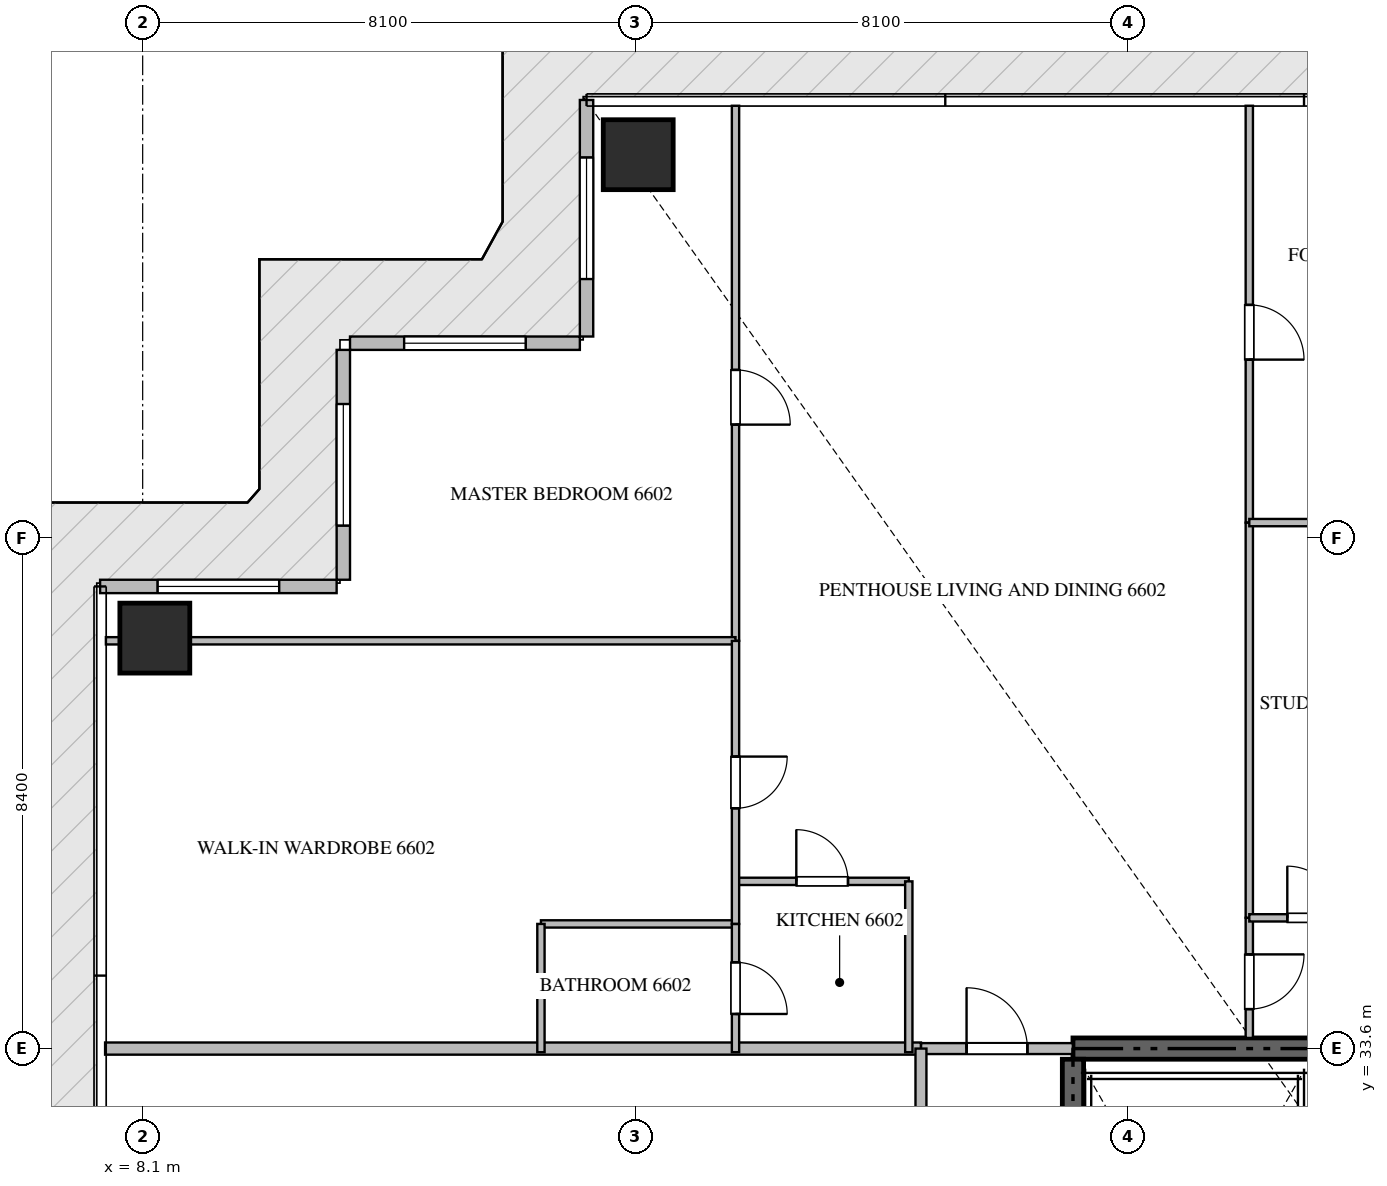
"""IFC4 building model, lengths in metres.
Left out: names, types, materials, properties, quantities, classifications, styles, units other than length and angle.
Written with IfcOpenShell. Run it as: python <this file> out.ifc"""

import sys

from ifc_helpers import new_model, si_unit, direction, frame, frame_2d, origin, origin_2d, place, context, subcontext, project, spatial, rectangle, extrude, source, transform, mapped, element, fill, save


model = new_model("IFC4")
c1 = context("Model", 3, precision=1e-05, world=origin(), true_north=direction((0.0, 1.0)))
c2 = subcontext(c1, "Body", "Model", "MODEL_VIEW")
j1 = project(units=[si_unit("LENGTHUNIT", "METRE"), si_unit("PLANEANGLEUNIT", "RADIAN")], contexts=[c1])
p1 = place(None, origin())
s1 = spatial("IfcSite", under=j1, at=p1, CompositionType="ELEMENT")
p2 = place(p1, origin())
s2 = spatial("IfcBuilding", under=s1, at=p2, CompositionType="ELEMENT")
p3 = place(p2, frame((0.0, 0.0, 264.35)))
s3 = spatial("IfcBuildingStorey", under=s2, at=p3, CompositionType="ELEMENT", Elevation=264.35)
p4 = place(p3, frame((41.4, 33.6, -0.26), z_axis=(0.0, 0.0, 1.0), x_axis=(-1.0, 0.0, 0.0)))
e1 = element("IfcWall", 1, at=p4, inside=s3, PredefinedType="SHEAR", context=c2, shape_type="SweptSolid", body=[
    extrude(rectangle(XDim=18.0, YDim=0.35, at=frame_2d((9.0, 0.0))), origin(), (0.0, 0.0, 1.0), 3.848),
])
p5 = place(p3, frame((23.4, 24.25, -0.26), z_axis=(0.0, 0.0, 1.0), x_axis=(0.0, 1.0, 0.0)))
e2 = element("IfcWall", 2, at=p5, inside=s3, PredefinedType="SHEAR", context=c2, shape_type="SweptSolid", body=[
    extrude(rectangle(XDim=9.175, YDim=0.35, at=frame_2d((4.587, 0.0))), origin(), (0.0, 0.0, 1.0), 3.848),
])
m1 = source(origin(), c2, "Body", "SweptSolid", [
    extrude(rectangle(XDim=1.15, YDim=1.15, at=origin_2d()), origin(), (0.0, 0.0, 1.0), 3.85),
])
for number, where, z_axis, x_axis in (
    (3, (16.25, 48.3, -0.26), (0.0, 0.0, 1.0), (1.0, 0.0, 0.0)),
    (4, (8.3, 40.35, -0.26), (0.0, 0.0, 1.0), (1.0, 0.0, 0.0)),
):
    element("IfcColumn", number, at=place(p3, frame(where, z_axis=z_axis, x_axis=x_axis)), inside=s3, PredefinedType="COLUMN", context=c2, shape_type="MappedRepresentation", body=[
        mapped(m1, transform((0.0, 0.0, 0.0), scale=1.0)),
    ])
p6 = place(p3, frame((15.4, 49.2, 0.0), z_axis=(0.0, 0.0, 1.0), x_axis=(0.0, -1.0, 0.0)))
e5 = element("IfcWall", 5, at=p6, inside=s3, PredefinedType="ELEMENTEDWALL", context=c2, shape_type="SweptSolid", body=[
    extrude(rectangle(XDim=3.89, YDim=0.22, at=frame_2d((1.945, 0.0))), origin(), (0.0, 0.0, 1.0), 3.575),
])
p7 = place(p6, frame((0.945, 0.0, 0.65)))
e6 = element("IfcOpeningElement", 6, at=p7, cuts=e5, PredefinedType="OPENING", context=c2, shape_type="SweptSolid", body=[
    extrude(rectangle(XDim=2.0, YDim=2.2, at=frame_2d((1.0, 1.1))), frame((0.0, 0.12, 0.0), z_axis=(0.0, -1.0, 0.0), x_axis=(1.0, 0.0, 0.0)), (0.0, 0.0, 1.0), 0.24),
])
p8 = place(p3, frame((15.29, 45.2, 0.0), z_axis=(0.0, 0.0, 1.0), x_axis=(-1.0, 0.0, 0.0)))
e7 = element("IfcWall", 7, at=p8, inside=s3, PredefinedType="ELEMENTEDWALL", context=c2, shape_type="SweptSolid", body=[
    extrude(rectangle(XDim=3.78, YDim=0.22, at=frame_2d((1.89, 0.0))), origin(), (0.0, 0.0, 1.0), 3.575),
])
p9 = place(p8, frame((0.89, 0.0, 0.65)))
e8 = element("IfcOpeningElement", 8, at=p9, cuts=e7, PredefinedType="OPENING", context=c2, shape_type="SweptSolid", body=[
    extrude(rectangle(XDim=2.0, YDim=2.2, at=frame_2d((1.0, 1.1))), frame((0.0, 0.12, 0.0), z_axis=(0.0, -1.0, 0.0), x_axis=(1.0, 0.0, 0.0)), (0.0, 0.0, 1.0), 0.24),
])
p10 = place(p3, frame((11.4, 45.09, 0.0), z_axis=(0.0, 0.0, 1.0), x_axis=(0.0, -1.0, 0.0)))
e9 = element("IfcWall", 9, at=p10, inside=s3, PredefinedType="ELEMENTEDWALL", context=c2, shape_type="SweptSolid", body=[
    extrude(rectangle(XDim=3.78, YDim=0.22, at=frame_2d((1.89, 0.0))), origin(), (0.0, 0.0, 1.0), 3.575),
])
p11 = place(p10, frame((0.89, 0.0, 0.65)))
e10 = element("IfcOpeningElement", 10, at=p11, cuts=e9, PredefinedType="OPENING", context=c2, shape_type="SweptSolid", body=[
    extrude(rectangle(XDim=2.0, YDim=2.2, at=frame_2d((1.0, 1.1))), frame((0.0, 0.12, 0.0), z_axis=(0.0, -1.0, 0.0), x_axis=(1.0, 0.0, 0.0)), (0.0, 0.0, 1.0), 0.24),
])
p12 = place(p3, frame((11.29, 41.2, 0.0), z_axis=(0.0, 0.0, 1.0), x_axis=(-1.0, 0.0, 0.0)))
e11 = element("IfcWall", 11, at=p12, inside=s3, PredefinedType="ELEMENTEDWALL", context=c2, shape_type="SweptSolid", body=[
    extrude(rectangle(XDim=3.89, YDim=0.22, at=frame_2d((1.945, 0.0))), origin(), (0.0, 0.0, 1.0), 3.575),
])
p13 = place(p12, frame((0.945, 0.0, 0.65)))
e12 = element("IfcOpeningElement", 12, at=p13, cuts=e11, PredefinedType="OPENING", context=c2, shape_type="SweptSolid", body=[
    extrude(rectangle(XDim=2.0, YDim=2.2, at=frame_2d((1.0, 1.1))), frame((0.0, 0.12, 0.0), z_axis=(0.0, -1.0, 0.0), x_axis=(1.0, 0.0, 0.0)), (0.0, 0.0, 1.0), 0.24),
])
p14 = place(p3, frame((7.482, 33.6, 0.0), z_axis=(0.0, 0.0, 1.0), x_axis=(1.0, 0.0, 0.0)))
e13 = element("IfcWall", 13, at=p14, inside=s3, PredefinedType="PARTITIONING", context=c2, shape_type="SweptSolid", body=[
    extrude(rectangle(XDim=13.418, YDim=0.2, at=frame_2d((6.709, 0.0))), origin(), (0.0, 0.0, 1.0), 3.59),
])
p15 = place(p3, frame((20.902, 33.6, 0.0), z_axis=(0.0, 0.0, 1.0), x_axis=(1.0, 0.0, 0.0)))
e14 = element("IfcWall", 14, at=p15, inside=s3, PredefinedType="PARTITIONING", context=c2, shape_type="SweptSolid", body=[
    extrude(rectangle(XDim=2.496, YDim=0.18, at=frame_2d((1.248, 0.0))), origin(), (0.0, 0.0, 1.0), 3.59),
])
p16 = place(p15, frame((0.748, 0.0, 0.0)))
e15 = element("IfcOpeningElement", 15, at=p16, cuts=e14, PredefinedType="OPENING", context=c2, shape_type="SweptSolid", body=[
    extrude(rectangle(XDim=1.0, YDim=2.15, at=frame_2d((0.5, 1.075))), frame((0.0, 0.1, 0.0), z_axis=(0.0, -1.0, 0.0), x_axis=(1.0, 0.0, 0.0)), (0.0, 0.0, 1.0), 0.2),
])
p17 = place(p3, frame((20.9, 16.8, 0.0), z_axis=(0.0, 0.0, 1.0), x_axis=(0.0, 1.0, 0.0)))
e16 = element("IfcWall", 16, at=p17, inside=s3, PredefinedType="PARTITIONING", context=c2, shape_type="SweptSolid", body=[
    extrude(rectangle(XDim=16.8, YDim=0.18, at=frame_2d((8.4, 0.0))), origin(), (0.0, 0.0, 1.0), 3.59),
])
p18 = place(p17, frame((4.993, 0.0, 0.0)))
e17 = element("IfcOpeningElement", 17, at=p18, cuts=e16, PredefinedType="OPENING", context=c2, shape_type="SweptSolid", body=[
    extrude(rectangle(XDim=1.0, YDim=2.15, at=frame_2d((0.5, 1.075))), frame((0.0, 0.1, 0.0), z_axis=(0.0, -1.0, 0.0), x_axis=(1.0, 0.0, 0.0)), (0.0, 0.0, 1.0), 0.2),
])
p19 = place(p17, frame((13.351, 0.0, 0.0)))
e18 = element("IfcOpeningElement", 18, at=p19, cuts=e16, PredefinedType="OPENING", context=c2, shape_type="SweptSolid", body=[
    extrude(rectangle(XDim=1.0, YDim=2.15, at=frame_2d((0.5, 1.075))), frame((0.0, 0.1, 0.0), z_axis=(0.0, -1.0, 0.0), x_axis=(1.0, 0.0, 0.0)), (0.0, 0.0, 1.0), 0.2),
])
p20 = place(p3, frame((17.85, 36.35, 0.0), z_axis=(0.0, 0.0, 1.0), x_axis=(1.0, 0.0, 0.0)))
e19 = element("IfcWall", 19, at=p20, inside=s3, PredefinedType="PARTITIONING", context=c2, shape_type="SweptSolid", body=[
    extrude(rectangle(XDim=2.85, YDim=0.12, at=frame_2d((1.425, 0.0))), origin(), (0.0, 0.0, 1.0), 3.59),
])
p21 = place(p20, frame((1.0, 0.0, 0.0)))
e20 = element("IfcOpeningElement", 20, at=p21, cuts=e19, PredefinedType="OPENING", context=c2, shape_type="SweptSolid", body=[
    extrude(rectangle(XDim=0.85, YDim=2.1, at=frame_2d((0.425, 1.05))), frame((0.0, 0.07, 0.0), z_axis=(0.0, -1.0, 0.0), x_axis=(1.0, 0.0, 0.0)), (0.0, 0.0, 1.0), 0.14),
])
p22 = place(p3, frame((20.7, 36.35, 0.0), z_axis=(0.0, 0.0, 1.0), x_axis=(0.0, -1.0, 0.0)))
e21 = element("IfcWall", 21, at=p22, inside=s3, PredefinedType="PARTITIONING", context=c2, shape_type="SweptSolid", body=[
    extrude(rectangle(XDim=2.81, YDim=0.12, at=frame_2d((1.405, 0.0))), origin(), (0.0, 0.0, 1.0), 3.59),
])
p23 = place(p3, frame((17.85, 49.105, 0.0), z_axis=(0.0, 0.0, 1.0), x_axis=(0.0, -1.0, 0.0)))
e22 = element("IfcWall", 22, at=p23, inside=s3, PredefinedType="PARTITIONING", context=c2, shape_type="SweptSolid", body=[
    extrude(rectangle(XDim=8.799, YDim=0.12, at=frame_2d((4.399, 0.0))), origin(), (0.0, 0.0, 1.0), 3.59),
])
p24 = place(p23, frame((4.344, 0.0, 0.0)))
e23 = element("IfcOpeningElement", 23, at=p24, cuts=e22, PredefinedType="OPENING", context=c2, shape_type="SweptSolid", body=[
    extrude(rectangle(XDim=0.9, YDim=2.1, at=frame_2d((0.45, 1.05))), frame((0.0, 0.07, 0.0), z_axis=(0.0, -1.0, 0.0), x_axis=(1.0, 0.0, 0.0)), (0.0, 0.0, 1.0), 0.14),
])
p25 = place(p3, frame((7.495, 40.306, 0.0), z_axis=(0.0, 0.0, 1.0), x_axis=(1.0, 0.0, 0.0)))
e24 = element("IfcWall", 24, at=p25, inside=s3, PredefinedType="PARTITIONING", context=c2, shape_type="SweptSolid", body=[
    extrude(rectangle(XDim=10.355, YDim=0.12, at=frame_2d((5.177, 0.0))), origin(), (0.0, 0.0, 1.0), 3.122),
])
p26 = place(p3, frame((14.65, 35.65, 0.0), z_axis=(0.0, 0.0, 1.0), x_axis=(1.0, 0.0, 0.0)))
e25 = element("IfcWall", 25, at=p26, inside=s3, PredefinedType="PARTITIONING", context=c2, shape_type="SweptSolid", body=[
    extrude(rectangle(XDim=3.2, YDim=0.12, at=frame_2d((1.6, 0.0))), origin(), (0.0, 0.0, 1.0), 3.59),
])
p27 = place(p3, frame((14.65, 35.65, 0.0), z_axis=(0.0, 0.0, 1.0), x_axis=(0.0, -1.0, 0.0)))
e26 = element("IfcWall", 26, at=p27, inside=s3, PredefinedType="PARTITIONING", context=c2, shape_type="SweptSolid", body=[
    extrude(rectangle(XDim=2.11, YDim=0.12, at=frame_2d((1.055, 0.0))), origin(), (0.0, 0.0, 1.0), 3.59),
])
p28 = place(p3, frame((17.85, 40.304, 0.0), z_axis=(0.0, 0.0, 1.0), x_axis=(0.0, -1.0, 0.0)))
e27 = element("IfcWall", 27, at=p28, inside=s3, PredefinedType="PARTITIONING", context=c2, shape_type="SweptSolid", body=[
    extrude(rectangle(XDim=4.654, YDim=0.12, at=frame_2d((2.327, 0.0))), origin(), (0.0, 0.0, 1.0), 3.59),
])
p29 = place(p28, frame((1.902, 0.0, 0.0)))
e28 = element("IfcOpeningElement", 28, at=p29, cuts=e27, PredefinedType="OPENING", context=c2, shape_type="SweptSolid", body=[
    extrude(rectangle(XDim=0.85, YDim=2.1, at=frame_2d((0.425, 1.05))), frame((0.0, 0.07, 0.0), z_axis=(0.0, -1.0, 0.0), x_axis=(1.0, 0.0, 0.0)), (0.0, 0.0, 1.0), 0.14),
])
p30 = place(p3, frame((17.85, 35.648, 0.0), z_axis=(0.0, 0.0, 1.0), x_axis=(0.0, -1.0, 0.0)))
e29 = element("IfcWall", 29, at=p30, inside=s3, PredefinedType="PARTITIONING", context=c2, shape_type="SweptSolid", body=[
    extrude(rectangle(XDim=2.108, YDim=0.12, at=frame_2d((1.054, 0.0))), origin(), (0.0, 0.0, 1.0), 3.59),
])
p31 = place(p30, frame((0.629, 0.0, 0.0)))
e30 = element("IfcOpeningElement", 30, at=p31, cuts=e29, PredefinedType="OPENING", context=c2, shape_type="SweptSolid", body=[
    extrude(rectangle(XDim=0.85, YDim=2.1, at=frame_2d((0.425, 1.05))), frame((0.0, 0.07, 0.0), z_axis=(0.0, -1.0, 0.0), x_axis=(1.0, 0.0, 0.0)), (0.0, 0.0, 1.0), 0.14),
])
p32 = place(p3, frame((26.3, 35.75, 0.0), z_axis=(0.0, 0.0, 1.0), x_axis=(0.0, -1.0, 0.0)))
e31 = element("IfcWall", 31, at=p32, inside=s3, PredefinedType="PARTITIONING", context=c2, shape_type="SweptSolid", body=[
    extrude(rectangle(XDim=1.975, YDim=0.12, at=frame_2d((0.988, 0.0))), origin(), (0.0, 0.0, 1.0), 3.59),
])
p33 = place(p32, frame((0.601, 0.0, 0.0)))
e32 = element("IfcOpeningElement", 32, at=p33, cuts=e31, PredefinedType="OPENING", context=c2, shape_type="SweptSolid", body=[
    extrude(rectangle(XDim=0.9, YDim=2.1, at=frame_2d((0.45, 1.05))), frame((0.0, 0.07, 0.0), z_axis=(0.0, -1.0, 0.0), x_axis=(1.0, 0.0, 0.0)), (0.0, 0.0, 1.0), 0.14),
])
p34 = place(p3, frame((26.3, 49.105, 0.0), z_axis=(0.0, 0.0, 1.0), x_axis=(0.0, -1.0, 0.0)))
e33 = element("IfcWall", 33, at=p34, inside=s3, PredefinedType="PARTITIONING", context=c2, shape_type="SweptSolid", body=[
    extrude(rectangle(XDim=6.855, YDim=0.12, at=frame_2d((3.427, 0.0))), origin(), (0.0, 0.0, 1.0), 3.59),
])
p35 = place(p34, frame((3.275, 0.0, 0.0)))
e34 = element("IfcOpeningElement", 34, at=p35, cuts=e33, PredefinedType="OPENING", context=c2, shape_type="SweptSolid", body=[
    extrude(rectangle(XDim=0.9, YDim=2.1, at=frame_2d((0.45, 1.05))), frame((0.0, 0.07, 0.0), z_axis=(0.0, -1.0, 0.0), x_axis=(1.0, 0.0, 0.0)), (0.0, 0.0, 1.0), 0.14),
])
p36 = place(p3, frame((26.3, 42.248, 0.0), z_axis=(0.0, 0.0, 1.0), x_axis=(0.0, -1.0, 0.0)))
e35 = element("IfcWall", 35, at=p36, inside=s3, PredefinedType="PARTITIONING", context=c2, shape_type="SweptSolid", body=[
    extrude(rectangle(XDim=6.496, YDim=0.12, at=frame_2d((3.248, 0.0))), origin(), (0.0, 0.0, 1.0), 3.59),
])
p37 = place(p3, frame((26.3, 42.25, 0.0), z_axis=(0.0, 0.0, 1.0), x_axis=(1.0, 0.0, 0.0)))
e36 = element("IfcWall", 36, at=p37, inside=s3, PredefinedType="PARTITIONING", context=c2, shape_type="SweptSolid", body=[
    extrude(rectangle(XDim=5.15, YDim=0.12, at=frame_2d((2.575, 0.0))), origin(), (0.0, 0.0, 1.0), 3.59),
])
p38 = place(p3, frame((26.3, 35.75, 0.0), z_axis=(0.0, 0.0, 1.0), x_axis=(1.0, 0.0, 0.0)))
e37 = element("IfcWall", 37, at=p38, inside=s3, PredefinedType="PARTITIONING", context=c2, shape_type="SweptSolid", body=[
    extrude(rectangle(XDim=2.1, YDim=0.12, at=frame_2d((1.05, 0.0))), origin(), (0.0, 0.0, 1.0), 3.59),
])
p39 = place(p38, frame((0.625, 0.0, 0.0)))
e38 = element("IfcOpeningElement", 38, at=p39, cuts=e37, PredefinedType="OPENING", context=c2, shape_type="SweptSolid", body=[
    extrude(rectangle(XDim=0.85, YDim=2.1, at=frame_2d((0.425, 1.05))), frame((0.0, 0.07, 0.0), z_axis=(0.0, -1.0, 0.0), x_axis=(1.0, 0.0, 0.0)), (0.0, 0.0, 1.0), 0.14),
])
m2 = source(origin(), c2, "Body", "SweptSolid", [
    extrude(rectangle(XDim=2.0, YDim=2.2, at=frame_2d((1.0, 1.1))), frame((0.0, 0.03, 0.0), z_axis=(0.0, -1.0, 0.0), x_axis=(1.0, 0.0, 0.0)), (0.0, 0.0, 1.0), 0.06),
])
p40 = place(p7, origin())
e39 = element("IfcWindow", 39, at=p40, inside=s3, PartitioningType="SINGLE_PANEL", PredefinedType="WINDOW", context=c2, shape_type="MappedRepresentation", body=[
    mapped(m2, transform((0.0, 0.0, 0.0), scale=1.0)),
])
fill(e6, e39)
p41 = place(p9, origin())
e40 = element("IfcWindow", 40, at=p41, inside=s3, PartitioningType="SINGLE_PANEL", PredefinedType="WINDOW", context=c2, shape_type="MappedRepresentation", body=[
    mapped(m2, transform((0.0, 0.0, 0.0), scale=1.0)),
])
fill(e8, e40)
p42 = place(p11, origin())
e41 = element("IfcWindow", 41, at=p42, inside=s3, PartitioningType="SINGLE_PANEL", PredefinedType="WINDOW", context=c2, shape_type="MappedRepresentation", body=[
    mapped(m2, transform((0.0, 0.0, 0.0), scale=1.0)),
])
fill(e10, e41)
p43 = place(p13, origin())
e42 = element("IfcWindow", 42, at=p43, inside=s3, PartitioningType="SINGLE_PANEL", PredefinedType="WINDOW", context=c2, shape_type="MappedRepresentation", body=[
    mapped(m2, transform((0.0, 0.0, 0.0), scale=1.0)),
])
fill(e12, e42)
m3 = source(origin(), c2, "Body", "SweptSolid", [
    extrude(rectangle(XDim=1.0, YDim=2.15, at=frame_2d((0.5, 1.075))), frame((0.0, 0.025, 0.0), z_axis=(0.0, -1.0, 0.0), x_axis=(1.0, 0.0, 0.0)), (0.0, 0.0, 1.0), 0.05),
])
p44 = place(p16, origin())
e43 = element("IfcDoor", 43, at=p44, inside=s3, OperationType="SINGLE_SWING_LEFT", PredefinedType="DOOR", context=c2, shape_type="MappedRepresentation", body=[
    mapped(m3, transform((0.0, 0.0, 0.0), scale=1.0)),
])
fill(e15, e43)
m4 = source(origin(), c2, "Body", "SweptSolid", [
    extrude(rectangle(XDim=0.85, YDim=2.1, at=frame_2d((0.425, 1.05))), frame((0.0, 0.025, 0.0), z_axis=(0.0, -1.0, 0.0), x_axis=(1.0, 0.0, 0.0)), (0.0, 0.0, 1.0), 0.05),
])
p45 = place(p21, origin())
e44 = element("IfcDoor", 44, at=p45, inside=s3, OperationType="SINGLE_SWING_LEFT", PredefinedType="DOOR", context=c2, shape_type="MappedRepresentation", body=[
    mapped(m4, transform((0.0, 0.0, 0.0), scale=1.0)),
])
fill(e20, e44)
m5 = source(origin(), c2, "Body", "SweptSolid", [
    extrude(rectangle(XDim=0.9, YDim=2.1, at=frame_2d((0.45, 1.05))), frame((0.0, 0.025, 0.0), z_axis=(0.0, -1.0, 0.0), x_axis=(1.0, 0.0, 0.0)), (0.0, 0.0, 1.0), 0.05),
])
p46 = place(p24, origin())
e45 = element("IfcDoor", 45, at=p46, inside=s3, OperationType="SINGLE_SWING_RIGHT", PredefinedType="DOOR", context=c2, shape_type="MappedRepresentation", body=[
    mapped(m5, transform((0.0, 0.0, 0.0), scale=1.0)),
])
fill(e23, e45)
p47 = place(p29, origin())
e46 = element("IfcDoor", 46, at=p47, inside=s3, OperationType="SINGLE_SWING_LEFT", PredefinedType="DOOR", context=c2, shape_type="MappedRepresentation", body=[
    mapped(m4, transform((0.0, 0.0, 0.0), scale=1.0)),
])
fill(e28, e46)
p48 = place(p31, origin())
e47 = element("IfcDoor", 47, at=p48, inside=s3, OperationType="SINGLE_SWING_RIGHT", PredefinedType="DOOR", context=c2, shape_type="MappedRepresentation", body=[
    mapped(m4, transform((0.0, 0.0, 0.0), scale=1.0)),
])
fill(e30, e47)
p49 = place(p33, origin())
e48 = element("IfcDoor", 48, at=p49, inside=s3, OperationType="SINGLE_SWING_LEFT", PredefinedType="DOOR", context=c2, shape_type="MappedRepresentation", body=[
    mapped(m5, transform((0.0, 0.0, 0.0), scale=1.0)),
])
fill(e32, e48)
p50 = place(p35, origin())
e49 = element("IfcDoor", 49, at=p50, inside=s3, OperationType="SINGLE_SWING_RIGHT", PredefinedType="DOOR", context=c2, shape_type="MappedRepresentation", body=[
    mapped(m5, transform((0.0, 0.0, 0.0), scale=1.0)),
])
fill(e34, e49)
p51 = place(p39, origin())
e50 = element("IfcDoor", 50, at=p51, inside=s3, OperationType="SINGLE_SWING_LEFT", PredefinedType="DOOR", context=c2, shape_type="MappedRepresentation", body=[
    mapped(m4, transform((0.0, 0.0, 0.0), scale=1.0)),
])
fill(e38, e50)
save(model, sys.argv[1])
